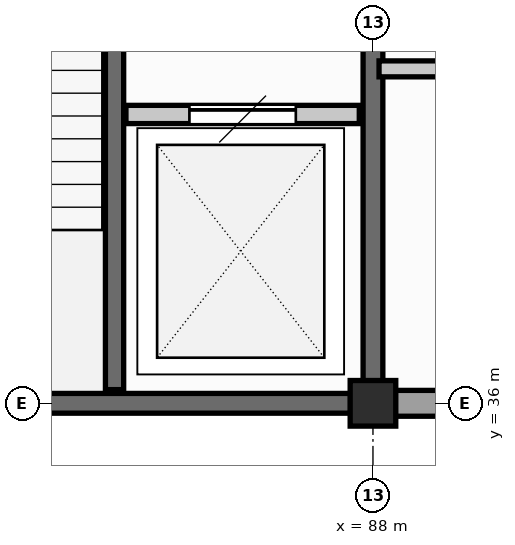
"""IFC4 building model, lengths in metres.
Left out: names, types, materials, properties, quantities, classifications, styles, units other than length and angle.
Written with IfcOpenShell. Run it as: python <this file> out.ifc"""

import sys

from ifc_helpers import new_model, si_unit, direction, frame, frame_2d, origin, origin_2d, place, context, subcontext, project, spatial, rectangle, extrude, element, fill, save


model = new_model("IFC4")
c1 = context("Model", 3, precision=1e-05, world=origin(), true_north=direction((0.0, 1.0)))
c2 = subcontext(c1, "Body", "Model", "MODEL_VIEW")
j1 = project(units=[si_unit("LENGTHUNIT", "METRE"), si_unit("PLANEANGLEUNIT", "RADIAN")], contexts=[c1])
p1 = place(None, origin())
s1 = spatial("IfcSite", under=j1, at=p1, CompositionType="ELEMENT")
p2 = place(p1, origin())
s2 = spatial("IfcBuilding", under=s1, at=p2, CompositionType="ELEMENT")
p3 = place(p2, frame((0.0, 0.0, 9.0)))
s3 = spatial("IfcBuildingStorey", under=s2, at=p3, CompositionType="ELEMENT", Elevation=9.0)
p4 = place(p3, frame((88.0, 36.0, 0.0), z_axis=(0.0, 0.0, 1.0), x_axis=(1.0, 0.0, 0.0)))
e1 = element("IfcColumn", 1, at=p4, inside=s3, PredefinedType="COLUMN", context=c2, shape_type="SweptSolid", body=[
    extrude(rectangle(XDim=0.6, YDim=0.6, at=origin_2d()), origin(), (0.0, 0.0, 1.0), 4.2),
])
p5 = place(p3, frame((88.295, 36.0, 0.0), z_axis=(0.0, 0.0, 1.0), x_axis=(1.0, 0.0, 0.0)))
e2 = element("IfcWall", 2, at=p5, inside=s3, PredefinedType="SOLIDWALL", context=c2, shape_type="SweptSolid", body=[
    extrude(rectangle(XDim=7.41, YDim=0.34, at=frame_2d((3.705, 0.0))), origin(), (0.0, 0.0, 1.0), 3.05),
])
p6 = place(p3, frame((80.295, 36.0, 0.0), z_axis=(0.0, 0.0, 1.0), x_axis=(1.0, 0.0, 0.0)))
e3 = element("IfcWall", 3, at=p6, inside=s3, PredefinedType="SHEAR", context=c2, shape_type="SweptSolid", body=[
    extrude(rectangle(XDim=7.41, YDim=0.26, at=frame_2d((3.705, 0.0))), origin(), (0.0, 0.0, 1.0), 3.985),
])
p7 = place(p3, frame((88.0, 36.295, 0.0), z_axis=(0.0, 0.0, 1.0), x_axis=(0.0, 1.0, 0.0)))
e4 = element("IfcWall", 4, at=p7, inside=s3, PredefinedType="SHEAR", context=c2, shape_type="SweptSolid", body=[
    extrude(rectangle(XDim=8.41, YDim=0.26, at=frame_2d((4.205, 0.0))), origin(), (0.0, 0.0, 1.0), 3.985),
])
p8 = place(p7, frame((5.75, 0.0, 0.0)))
e5 = element("IfcOpeningElement", 5, at=p8, cuts=e4, PredefinedType="OPENING", context=c2, shape_type="SweptSolid", body=[
    extrude(rectangle(XDim=1.6, YDim=2.2, at=frame_2d((0.8, 1.1))), frame((0.0, 0.14, 0.0), z_axis=(0.0, -1.0, 0.0), x_axis=(1.0, 0.0, 0.0)), (0.0, 0.0, 1.0), 0.28),
])
p9 = place(p3, frame((84.6, 36.18, 0.0), z_axis=(0.0, 0.0, 1.0), x_axis=(0.0, 1.0, 0.0)))
e6 = element("IfcWall", 6, at=p9, inside=s3, PredefinedType="SHEAR", context=c2, shape_type="SweptSolid", body=[
    extrude(rectangle(XDim=8.64, YDim=0.24, at=frame_2d((4.32, 0.0))), origin(), (0.0, 0.0, 1.0), 3.985),
])
p10 = place(p9, frame((6.02, 0.0, 0.0)))
e7 = element("IfcOpeningElement", 7, at=p10, cuts=e6, PredefinedType="OPENING", context=c2, shape_type="SweptSolid", body=[
    extrude(rectangle(XDim=1.35, YDim=2.2, at=frame_2d((0.675, 1.1))), frame((0.0, 0.13, 0.0), z_axis=(0.0, -1.0, 0.0), x_axis=(1.0, 0.0, 0.0)), (0.0, 0.0, 1.0), 0.26),
])
p11 = place(p9, frame((7.68, 0.0, 0.0)))
e8 = element("IfcOpeningElement", 8, at=p11, cuts=e6, PredefinedType="OPENING", context=c2, shape_type="SweptSolid", body=[
    extrude(rectangle(XDim=0.88, YDim=2.02, at=frame_2d((0.44, 1.01))), frame((0.0, 0.13, 0.0), z_axis=(0.0, -1.0, 0.0), x_axis=(1.0, 0.0, 0.0)), (0.0, 0.0, 1.0), 0.26),
])
p12 = place(p3, frame((84.75, 39.8, 0.0), z_axis=(0.0, 0.0, 1.0), x_axis=(1.0, 0.0, 0.0)))
e9 = element("IfcWall", 9, at=p12, inside=s3, PredefinedType="SHEAR", context=c2, shape_type="SweptSolid", body=[
    extrude(rectangle(XDim=3.07, YDim=0.24, at=frame_2d((1.535, 0.0))), origin(), (0.0, 0.0, 1.0), 3.335),
])
p13 = place(p12, frame((0.835, 0.0, 0.0)))
e10 = element("IfcOpeningElement", 10, at=p13, cuts=e9, PredefinedType="OPENING", context=c2, shape_type="SweptSolid", body=[
    extrude(rectangle(XDim=1.4, YDim=2.3, at=frame_2d((0.7, 1.15))), frame((0.0, 0.13, 0.0), z_axis=(0.0, -1.0, 0.0), x_axis=(1.0, 0.0, 0.0)), (0.0, 0.0, 1.0), 0.26),
])
p14 = place(p3, frame((88.08, 40.4, 0.0), z_axis=(0.0, 0.0, 1.0), x_axis=(1.0, 0.0, 0.0)))
e11 = element("IfcWall", 11, at=p14, inside=s3, PredefinedType="PARTITIONING", context=c2, shape_type="SweptSolid", body=[
    extrude(rectangle(XDim=7.84, YDim=0.21, at=frame_2d((3.92, 0.0))), origin(), (0.0, 0.0, 1.0), 3.05),
])
p15 = place(p14, frame((2.82, 0.0, 0.0)))
e12 = element("IfcOpeningElement", 12, at=p15, cuts=e11, PredefinedType="OPENING", context=c2, shape_type="SweptSolid", body=[
    extrude(rectangle(XDim=2.2, YDim=2.6, at=frame_2d((1.1, 1.3))), frame((0.0, 0.115, 0.0), z_axis=(0.0, -1.0, 0.0), x_axis=(1.0, 0.0, 0.0)), (0.0, 0.0, 1.0), 0.23),
])
p16 = place(p13, origin())
e13 = element("IfcDoor", 13, at=p16, inside=s3, OperationType="SLIDING_TO_LEFT", PredefinedType="DOOR", context=c2, shape_type="SweptSolid", body=[
    extrude(rectangle(XDim=1.4, YDim=2.3, at=frame_2d((0.7, 1.15))), frame((0.0, 0.025, 0.0), z_axis=(0.0, -1.0, 0.0), x_axis=(1.0, 0.0, 0.0)), (0.0, 0.0, 1.0), 0.05),
])
fill(e10, e13)
save(model, sys.argv[1])
